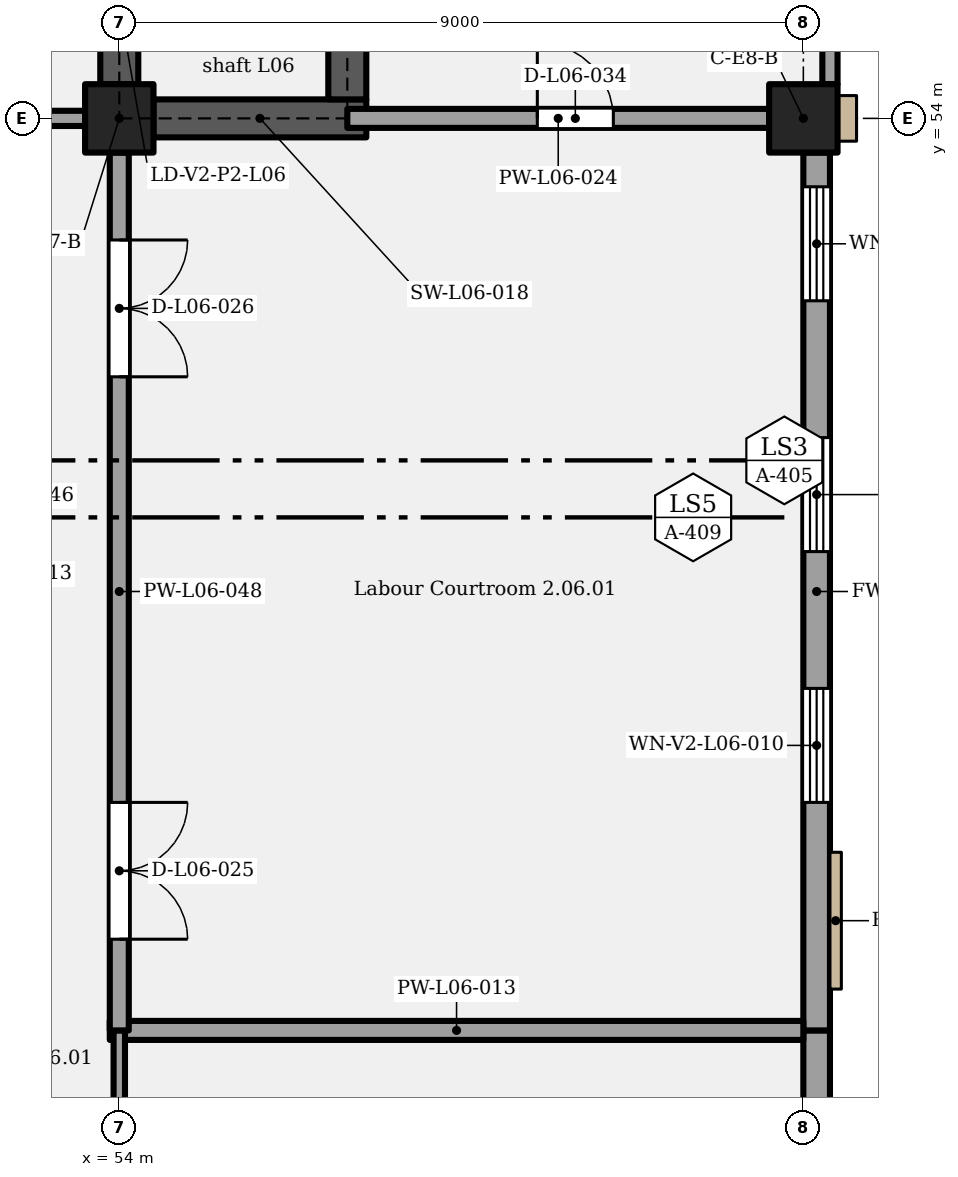
"""IFC4 building model, lengths in metres.
Left out: names, types, materials, properties, quantities, classifications, styles, units other than length and angle.
Written with IfcOpenShell. Run it as: python <this file> out.ifc"""

import sys

from ifc_helpers import new_model, si_unit, direction, frame, frame_2d, origin, origin_2d, place, context, subcontext, project, spatial, rectangle, extrude, element, fill, save


model = new_model("IFC4")
c1 = context("Model", 3, precision=1e-05, world=origin(), true_north=direction((0.0, 1.0)))
c2 = subcontext(c1, "Body", "Model", "MODEL_VIEW")
j1 = project(units=[si_unit("LENGTHUNIT", "METRE"), si_unit("PLANEANGLEUNIT", "RADIAN")], contexts=[c1])
p1 = place(None, origin())
s1 = spatial("IfcSite", under=j1, at=p1, CompositionType="ELEMENT")
p2 = place(p1, origin())
s2 = spatial("IfcBuilding", under=s1, at=p2, CompositionType="ELEMENT")
p3 = place(p2, frame((0.0, 0.0, 33.6)))
s3 = spatial("IfcBuildingStorey", under=s2, at=p3, CompositionType="ELEMENT", Elevation=33.6)
for number, where, z_axis, x_axis in (
    (1, (54.0, 54.0, 0.0), (0.0, 0.0, 1.0), (1.0, 0.0, 0.0)),
    (2, (63.0, 54.0, 0.0), (0.0, 0.0, 1.0), (1.0, 0.0, 0.0)),
):
    element("IfcColumn", number, at=place(p3, frame(where, z_axis=z_axis, x_axis=x_axis)), inside=s3, PredefinedType="COLUMN", context=c2, shape_type="SweptSolid", body=[
        extrude(rectangle(XDim=0.9, YDim=0.9, at=origin_2d()), origin(), (0.0, 0.0, 1.0), 5.4),
    ])
p4 = place(p3, frame((54.45, 54.0, 0.0), z_axis=(0.0, 0.0, 1.0), x_axis=(1.0, 0.0, 0.0)))
e3 = element("IfcWall", 3, at=p4, inside=s3, PredefinedType="SHEAR", context=c2, shape_type="SweptSolid", body=[
    extrude(rectangle(XDim=2.8, YDim=0.5, at=frame_2d((1.4, 0.0))), origin(), (0.0, 0.0, 1.0), 5.15),
])
p5 = place(p3, frame((57.0, 54.25, 0.0), z_axis=(0.0, 0.0, 1.0), x_axis=(0.0, 1.0, 0.0)))
e4 = element("IfcWall", 4, at=p5, inside=s3, PredefinedType="SHEAR", context=c2, shape_type="SweptSolid", body=[
    extrude(rectangle(XDim=2.5, YDim=0.5, at=frame_2d((1.25, 0.0))), origin(), (0.0, 0.0, 1.0), 5.15),
])
p6 = place(p3, frame((54.0, 54.45, 0.0), z_axis=(0.0, 0.0, 1.0), x_axis=(0.0, 1.0, 0.0)))
e5 = element("IfcWall", 5, at=p6, inside=s3, PredefinedType="SHEAR", context=c2, shape_type="SweptSolid", body=[
    extrude(rectangle(XDim=11.1, YDim=0.5, at=frame_2d((5.55, 0.0))), origin(), (0.0, 0.0, 1.0), 5.15),
])
p7 = place(p6, frame((0.5, 0.0, 0.0)))
e6 = element("IfcOpeningElement", 6, at=p7, cuts=e5, PredefinedType="OPENING", context=c2, shape_type="SweptSolid", body=[
    extrude(rectangle(XDim=1.1, YDim=2.1, at=frame_2d((0.55, 1.05))), frame((0.0, 0.26, 0.0), z_axis=(0.0, -1.0, 0.0), x_axis=(1.0, 0.0, 0.0)), (0.0, 0.0, 1.0), 0.52),
])
p8 = place(p6, frame((2.95, 0.0, 0.0)))
e7 = element("IfcOpeningElement", 7, at=p8, cuts=e5, PredefinedType="OPENING", context=c2, shape_type="SweptSolid", body=[
    extrude(rectangle(XDim=1.2, YDim=2.1, at=frame_2d((0.6, 1.05))), frame((0.0, 0.26, 0.0), z_axis=(0.0, -1.0, 0.0), x_axis=(1.0, 0.0, 0.0)), (0.0, 0.0, 1.0), 0.52),
])
p9 = place(p3, frame((63.175, 37.95, 0.0), z_axis=(0.0, 0.0, 1.0), x_axis=(0.0, 1.0, 0.0)))
e8 = element("IfcWall", 8, at=p9, inside=s3, PredefinedType="SOLIDWALL", context=c2, shape_type="SweptSolid", body=[
    extrude(rectangle(XDim=4.05, YDim=0.35, at=frame_2d((2.025, 0.0))), origin(), (0.0, 0.0, 1.0), 5.15),
])
p10 = place(p9, frame((0.4, 0.0, 1.05)))
e9 = element("IfcOpeningElement", 9, at=p10, cuts=e8, PredefinedType="OPENING", context=c2, shape_type="SweptSolid", body=[
    extrude(rectangle(XDim=1.05, YDim=2.4, at=frame_2d((0.525, 1.2))), frame((0.0, 0.185, 0.0), z_axis=(0.0, -1.0, 0.0), x_axis=(1.0, 0.0, 0.0)), (0.0, 0.0, 1.0), 0.37),
])
p11 = place(p3, frame((63.175, 42.0, 0.0), z_axis=(0.0, 0.0, 1.0), x_axis=(0.0, 1.0, 0.0)))
e10 = element("IfcWall", 10, at=p11, inside=s3, PredefinedType="SOLIDWALL", context=c2, shape_type="SweptSolid", body=[
    extrude(rectangle(XDim=11.55, YDim=0.35, at=frame_2d((5.775, 0.0))), origin(), (0.0, 0.0, 1.0), 5.15),
])
p12 = place(p11, frame((3.0, 0.0, 1.05)))
e11 = element("IfcOpeningElement", 11, at=p12, cuts=e10, PredefinedType="OPENING", context=c2, shape_type="SweptSolid", body=[
    extrude(rectangle(XDim=1.5, YDim=3.5, at=frame_2d((0.75, 1.75))), frame((0.0, 0.185, 0.0), z_axis=(0.0, -1.0, 0.0), x_axis=(1.0, 0.0, 0.0)), (0.0, 0.0, 1.0), 0.37),
])
p13 = place(p11, frame((6.3, 0.0, 1.05)))
e12 = element("IfcOpeningElement", 12, at=p13, cuts=e10, PredefinedType="OPENING", context=c2, shape_type="SweptSolid", body=[
    extrude(rectangle(XDim=1.5, YDim=3.5, at=frame_2d((0.75, 1.75))), frame((0.0, 0.185, 0.0), z_axis=(0.0, -1.0, 0.0), x_axis=(1.0, 0.0, 0.0)), (0.0, 0.0, 1.0), 0.37),
])
p14 = place(p11, frame((9.6, 0.0, 1.05)))
e13 = element("IfcOpeningElement", 13, at=p14, cuts=e10, PredefinedType="OPENING", context=c2, shape_type="SweptSolid", body=[
    extrude(rectangle(XDim=1.5, YDim=3.5, at=frame_2d((0.75, 1.75))), frame((0.0, 0.185, 0.0), z_axis=(0.0, -1.0, 0.0), x_axis=(1.0, 0.0, 0.0)), (0.0, 0.0, 1.0), 0.37),
])
p15 = place(p3, frame((63.35, 54.45, 0.0), z_axis=(0.0, 0.0, 1.0), x_axis=(0.0, 1.0, 0.0)))
e14 = element("IfcWall", 14, at=p15, inside=s3, PredefinedType="SOLIDWALL", context=c2, shape_type="SweptSolid", body=[
    extrude(rectangle(XDim=2.55, YDim=0.2, at=frame_2d((1.275, 0.0))), origin(), (0.0, 0.0, 1.0), 5.15),
])
p16 = place(p15, frame((0.525, 0.0, 1.05)))
e15 = element("IfcOpeningElement", 15, at=p16, cuts=e14, PredefinedType="OPENING", context=c2, shape_type="SweptSolid", body=[
    extrude(rectangle(XDim=1.05, YDim=2.4, at=frame_2d((0.525, 1.2))), frame((0.0, 0.11, 0.0), z_axis=(0.0, -1.0, 0.0), x_axis=(1.0, 0.0, 0.0)), (0.0, 0.0, 1.0), 0.22),
])
p17 = place(p3, frame((53.875, 42.0, 0.0), z_axis=(0.0, 0.0, 1.0), x_axis=(1.0, 0.0, 0.0)))
e16 = element("IfcWall", 16, at=p17, inside=s3, PredefinedType="PARTITIONING", context=c2, shape_type="SweptSolid", body=[
    extrude(rectangle(XDim=9.125, YDim=0.25, at=frame_2d((4.562, 0.0))), origin(), (0.0, 0.0, 1.0), 5.15),
])
p18 = place(p3, frame((49.5, 54.0, 0.0), z_axis=(0.0, 0.0, 1.0), x_axis=(1.0, 0.0, 0.0)))
e17 = element("IfcWall", 17, at=p18, inside=s3, PredefinedType="PARTITIONING", context=c2, shape_type="SweptSolid", body=[
    extrude(rectangle(XDim=4.05, YDim=0.2, at=frame_2d((2.025, 0.0))), origin(), (0.0, 0.0, 1.0), 4.4),
])
p19 = place(p18, frame((1.35, 0.0, 0.0)))
e18 = element("IfcOpeningElement", 18, at=p19, cuts=e17, PredefinedType="OPENING", context=c2, shape_type="SweptSolid", body=[
    extrude(rectangle(XDim=1.8, YDim=2.1, at=frame_2d((0.9, 1.05))), frame((0.0, 0.11, 0.0), z_axis=(0.0, -1.0, 0.0), x_axis=(1.0, 0.0, 0.0)), (0.0, 0.0, 1.0), 0.22),
])
p20 = place(p3, frame((57.0, 54.0, 0.0), z_axis=(0.0, 0.0, 1.0), x_axis=(1.0, 0.0, 0.0)))
e19 = element("IfcWall", 19, at=p20, inside=s3, PredefinedType="PARTITIONING", context=c2, shape_type="SweptSolid", body=[
    extrude(rectangle(XDim=5.55, YDim=0.25, at=frame_2d((2.775, 0.0))), origin(), (0.0, 0.0, 1.0), 4.4),
])
p21 = place(p20, frame((2.5, 0.0, 0.0)))
e20 = element("IfcOpeningElement", 20, at=p21, cuts=e19, PredefinedType="OPENING", context=c2, shape_type="SweptSolid", body=[
    extrude(rectangle(XDim=1.0, YDim=2.1, at=frame_2d((0.5, 1.05))), frame((0.0, 0.135, 0.0), z_axis=(0.0, -1.0, 0.0), x_axis=(1.0, 0.0, 0.0)), (0.0, 0.0, 1.0), 0.27),
])
p22 = place(p3, frame((54.0, 37.95, 0.0), z_axis=(0.0, 0.0, 1.0), x_axis=(0.0, 1.0, 0.0)))
e21 = element("IfcWall", 21, at=p22, inside=s3, PredefinedType="PARTITIONING", context=c2, shape_type="SweptSolid", body=[
    extrude(rectangle(XDim=4.05, YDim=0.15, at=frame_2d((2.025, 0.0))), origin(), (0.0, 0.0, 1.0), 4.2),
])
p23 = place(p22, frame((2.4, 0.0, 0.0), z_axis=(0.0, 0.0, 1.0), x_axis=(-1.0, 0.0, 0.0)))
e22 = element("IfcOpeningElement", 22, at=p23, cuts=e21, PredefinedType="OPENING", context=c2, shape_type="SweptSolid", body=[
    extrude(rectangle(XDim=1.2, YDim=2.1, at=frame_2d((0.6, 1.05))), frame((0.0, 0.085, 0.0), z_axis=(0.0, -1.0, 0.0), x_axis=(1.0, 0.0, 0.0)), (0.0, 0.0, 1.0), 0.17),
])
p24 = place(p3, frame((54.0, 42.0, 0.0), z_axis=(0.0, 0.0, 1.0), x_axis=(0.0, 1.0, 0.0)))
e23 = element("IfcWall", 23, at=p24, inside=s3, PredefinedType="PARTITIONING", context=c2, shape_type="SweptSolid", body=[
    extrude(rectangle(XDim=11.55, YDim=0.25, at=frame_2d((5.775, 0.0))), origin(), (0.0, 0.0, 1.0), 4.2),
])
p25 = place(p24, frame((3.0, 0.0, 0.0), z_axis=(0.0, 0.0, 1.0), x_axis=(-1.0, 0.0, 0.0)))
e24 = element("IfcOpeningElement", 24, at=p25, cuts=e23, PredefinedType="OPENING", context=c2, shape_type="SweptSolid", body=[
    extrude(rectangle(XDim=1.8, YDim=2.4, at=frame_2d((0.9, 1.2))), frame((0.0, 0.135, 0.0), z_axis=(0.0, -1.0, 0.0), x_axis=(1.0, 0.0, 0.0)), (0.0, 0.0, 1.0), 0.27),
])
p26 = place(p24, frame((10.4, 0.0, 0.0), z_axis=(0.0, 0.0, 1.0), x_axis=(-1.0, 0.0, 0.0)))
e25 = element("IfcOpeningElement", 25, at=p26, cuts=e23, PredefinedType="OPENING", context=c2, shape_type="SweptSolid", body=[
    extrude(rectangle(XDim=1.8, YDim=2.4, at=frame_2d((0.9, 1.2))), frame((0.0, 0.135, 0.0), z_axis=(0.0, -1.0, 0.0), x_axis=(1.0, 0.0, 0.0)), (0.0, 0.0, 1.0), 0.27),
])
p27 = place(p12, origin())
e26 = element("IfcWindow", 26, at=p27, inside=s3, PartitioningType="SINGLE_PANEL", PredefinedType="WINDOW", context=c2, shape_type="SweptSolid", body=[
    extrude(rectangle(XDim=1.5, YDim=3.5, at=frame_2d((0.75, 1.75))), frame((0.0, 0.03, 0.0), z_axis=(0.0, -1.0, 0.0), x_axis=(1.0, 0.0, 0.0)), (0.0, 0.0, 1.0), 0.06),
])
fill(e11, e26)
p28 = place(p13, origin())
e27 = element("IfcWindow", 27, at=p28, inside=s3, PartitioningType="SINGLE_PANEL", PredefinedType="WINDOW", context=c2, shape_type="SweptSolid", body=[
    extrude(rectangle(XDim=1.5, YDim=3.5, at=frame_2d((0.75, 1.75))), frame((0.0, 0.03, 0.0), z_axis=(0.0, -1.0, 0.0), x_axis=(1.0, 0.0, 0.0)), (0.0, 0.0, 1.0), 0.06),
])
fill(e12, e27)
p29 = place(p14, origin())
e28 = element("IfcWindow", 28, at=p29, inside=s3, PartitioningType="SINGLE_PANEL", PredefinedType="WINDOW", context=c2, shape_type="SweptSolid", body=[
    extrude(rectangle(XDim=1.5, YDim=3.5, at=frame_2d((0.75, 1.75))), frame((0.0, 0.03, 0.0), z_axis=(0.0, -1.0, 0.0), x_axis=(1.0, 0.0, 0.0)), (0.0, 0.0, 1.0), 0.06),
])
fill(e13, e28)
p30 = place(p25, origin())
e29 = element("IfcDoor", 29, at=p30, inside=s3, OperationType="DOUBLE_DOOR_SINGLE_SWING", PredefinedType="DOOR", context=c2, shape_type="SweptSolid", body=[
    extrude(rectangle(XDim=1.8, YDim=2.4, at=frame_2d((0.9, 1.2))), frame((0.0, 0.025, 0.0), z_axis=(0.0, -1.0, 0.0), x_axis=(1.0, 0.0, 0.0)), (0.0, 0.0, 1.0), 0.05),
])
fill(e24, e29)
p31 = place(p26, origin())
e30 = element("IfcDoor", 30, at=p31, inside=s3, OperationType="DOUBLE_DOOR_SINGLE_SWING", PredefinedType="DOOR", context=c2, shape_type="SweptSolid", body=[
    extrude(rectangle(XDim=1.8, YDim=2.4, at=frame_2d((0.9, 1.2))), frame((0.0, 0.025, 0.0), z_axis=(0.0, -1.0, 0.0), x_axis=(1.0, 0.0, 0.0)), (0.0, 0.0, 1.0), 0.05),
])
fill(e25, e30)
p32 = place(p21, origin())
e31 = element("IfcDoor", 31, at=p32, inside=s3, OperationType="SINGLE_SWING_LEFT", PredefinedType="DOOR", context=c2, shape_type="SweptSolid", body=[
    extrude(rectangle(XDim=1.0, YDim=2.1, at=frame_2d((0.5, 1.05))), frame((0.0, 0.025, 0.0), z_axis=(0.0, -1.0, 0.0), x_axis=(1.0, 0.0, 0.0)), (0.0, 0.0, 1.0), 0.05),
])
fill(e20, e31)
save(model, sys.argv[1])
